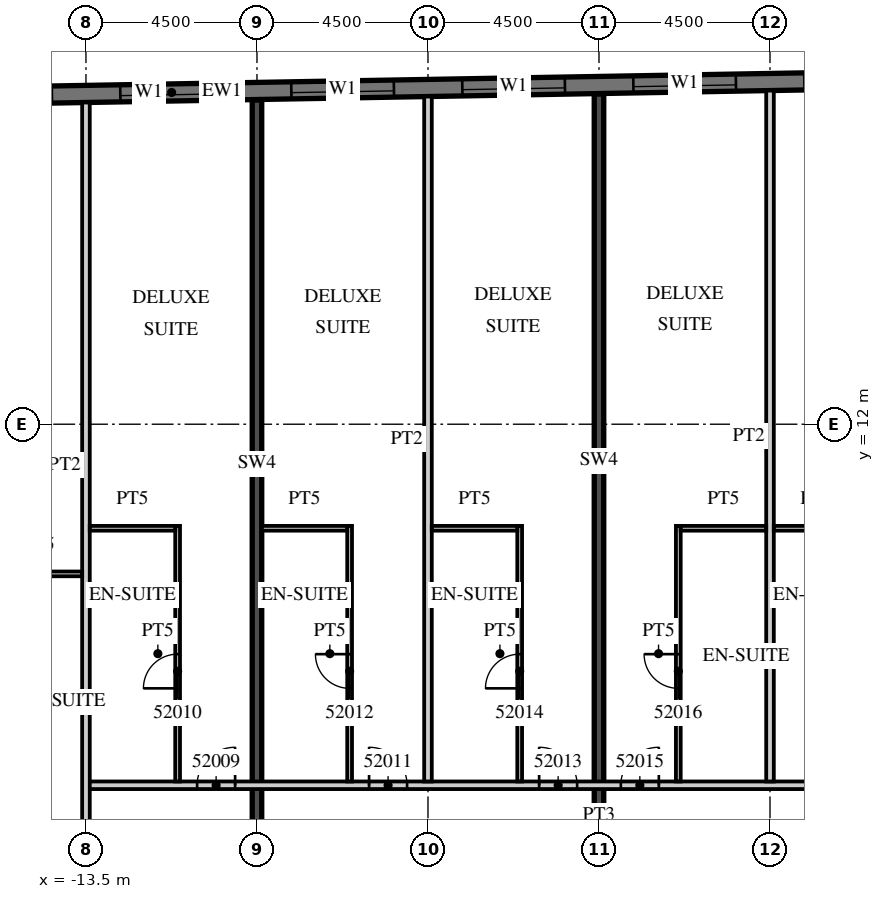
"""IFC4 building model, lengths in metres.
Left out: names, types, materials, properties, quantities, classifications, styles, units other than length and angle.
Written with IfcOpenShell. Run it as: python <this file> out.ifc"""

import sys

from ifc_helpers import new_model, si_unit, direction, frame, frame_2d, origin, place, context, subcontext, project, spatial, rectangle, extrude, element, fill, save


model = new_model("IFC4")
c1 = context("Model", 3, precision=1e-05, world=origin(), true_north=direction((0.0, 1.0)))
c2 = subcontext(c1, "Body", "Model", "MODEL_VIEW")
j1 = project(units=[si_unit("LENGTHUNIT", "METRE"), si_unit("PLANEANGLEUNIT", "RADIAN")], contexts=[c1])
p1 = place(None, origin())
s1 = spatial("IfcSite", under=j1, at=p1, CompositionType="ELEMENT")
p2 = place(p1, origin())
s2 = spatial("IfcBuilding", under=s1, at=p2, CompositionType="ELEMENT")
p3 = place(p2, frame((0.0, 0.0, 217.7)))
s3 = spatial("IfcBuildingStorey", under=s2, at=p3, CompositionType="ELEMENT", Elevation=217.7)
p4 = place(p3, frame((-9.0, 1.4, 0.0), z_axis=(0.0, 0.0, 1.0), x_axis=(0.0, 1.0, 0.0)))
e1 = element("IfcWall", 1, at=p4, inside=s3, PredefinedType="SHEAR", context=c2, shape_type="SweptSolid", body=[
    extrude(rectangle(XDim=19.132, YDim=0.25, at=frame_2d((9.566, 0.0))), origin(), (0.0, 0.0, 1.0), 3.3),
])
p5 = place(p3, frame((0.0, 1.4, 0.0), z_axis=(0.0, 0.0, 1.0), x_axis=(0.0, 1.0, 0.0)))
e2 = element("IfcWall", 2, at=p5, inside=s3, PredefinedType="SHEAR", context=c2, shape_type="SweptSolid", body=[
    extrude(rectangle(XDim=19.289, YDim=0.25, at=frame_2d((9.644, 0.0))), origin(), (0.0, 0.0, 1.0), 3.3),
])
p6 = place(p3, frame((13.504, 21.161, 0.0), z_axis=(0.0, 0.0, 1.0), x_axis=(-0.999847763257, -0.017448504532, 0.0)))
e3 = element("IfcWall", 3, at=p6, inside=s3, PredefinedType="SOLIDWALL", context=c2, shape_type="SweptSolid", body=[
    extrude(rectangle(XDim=46.859, YDim=0.45, at=frame_2d((23.43, 0.0))), origin(), (0.0, 0.0, 1.0), 3.02),
])
p7 = place(p6, frame((0.9, 0.0, 0.45)))
e4 = element("IfcOpeningElement", 4, at=p7, cuts=e3, PredefinedType="OPENING", context=c2, shape_type="SweptSolid", body=[
    extrude(rectangle(XDim=2.7, YDim=2.25, at=frame_2d((1.35, 1.125))), frame((0.0, 0.235, 0.0), z_axis=(0.0, -1.0, 0.0), x_axis=(1.0, 0.0, 0.0)), (0.0, 0.0, 1.0), 0.47),
])
p8 = place(p6, frame((5.401, 0.0, 0.45)))
e5 = element("IfcOpeningElement", 5, at=p8, cuts=e3, PredefinedType="OPENING", context=c2, shape_type="SweptSolid", body=[
    extrude(rectangle(XDim=2.7, YDim=2.25, at=frame_2d((1.35, 1.125))), frame((0.0, 0.235, 0.0), z_axis=(0.0, -1.0, 0.0), x_axis=(1.0, 0.0, 0.0)), (0.0, 0.0, 1.0), 0.47),
])
p9 = place(p6, frame((9.902, 0.0, 0.45)))
e6 = element("IfcOpeningElement", 6, at=p9, cuts=e3, PredefinedType="OPENING", context=c2, shape_type="SweptSolid", body=[
    extrude(rectangle(XDim=2.7, YDim=2.25, at=frame_2d((1.35, 1.125))), frame((0.0, 0.235, 0.0), z_axis=(0.0, -1.0, 0.0), x_axis=(1.0, 0.0, 0.0)), (0.0, 0.0, 1.0), 0.47),
])
p10 = place(p6, frame((14.402, 0.0, 0.45)))
e7 = element("IfcOpeningElement", 7, at=p10, cuts=e3, PredefinedType="OPENING", context=c2, shape_type="SweptSolid", body=[
    extrude(rectangle(XDim=2.7, YDim=2.25, at=frame_2d((1.35, 1.125))), frame((0.0, 0.235, 0.0), z_axis=(0.0, -1.0, 0.0), x_axis=(1.0, 0.0, 0.0)), (0.0, 0.0, 1.0), 0.47),
])
p11 = place(p6, frame((18.903, 0.0, 0.45)))
e8 = element("IfcOpeningElement", 8, at=p11, cuts=e3, PredefinedType="OPENING", context=c2, shape_type="SweptSolid", body=[
    extrude(rectangle(XDim=2.7, YDim=2.25, at=frame_2d((1.35, 1.125))), frame((0.0, 0.235, 0.0), z_axis=(0.0, -1.0, 0.0), x_axis=(1.0, 0.0, 0.0)), (0.0, 0.0, 1.0), 0.47),
])
p12 = place(p6, frame((23.404, 0.0, 0.45)))
e9 = element("IfcOpeningElement", 9, at=p12, cuts=e3, PredefinedType="OPENING", context=c2, shape_type="SweptSolid", body=[
    extrude(rectangle(XDim=2.7, YDim=2.25, at=frame_2d((1.35, 1.125))), frame((0.0, 0.235, 0.0), z_axis=(0.0, -1.0, 0.0), x_axis=(1.0, 0.0, 0.0)), (0.0, 0.0, 1.0), 0.47),
])
p13 = place(p6, frame((27.904, 0.0, 0.45)))
e10 = element("IfcOpeningElement", 10, at=p13, cuts=e3, PredefinedType="OPENING", context=c2, shape_type="SweptSolid", body=[
    extrude(rectangle(XDim=2.7, YDim=2.25, at=frame_2d((1.35, 1.125))), frame((0.0, 0.235, 0.0), z_axis=(0.0, -1.0, 0.0), x_axis=(1.0, 0.0, 0.0)), (0.0, 0.0, 1.0), 0.47),
])
p14 = place(p6, frame((32.405, 0.0, 0.45)))
e11 = element("IfcOpeningElement", 11, at=p14, cuts=e3, PredefinedType="OPENING", context=c2, shape_type="SweptSolid", body=[
    extrude(rectangle(XDim=2.7, YDim=2.25, at=frame_2d((1.35, 1.125))), frame((0.0, 0.235, 0.0), z_axis=(0.0, -1.0, 0.0), x_axis=(1.0, 0.0, 0.0)), (0.0, 0.0, 1.0), 0.47),
])
p15 = place(p6, frame((36.906, 0.0, 0.45)))
e12 = element("IfcOpeningElement", 12, at=p15, cuts=e3, PredefinedType="OPENING", context=c2, shape_type="SweptSolid", body=[
    extrude(rectangle(XDim=2.7, YDim=2.25, at=frame_2d((1.35, 1.125))), frame((0.0, 0.235, 0.0), z_axis=(0.0, -1.0, 0.0), x_axis=(1.0, 0.0, 0.0)), (0.0, 0.0, 1.0), 0.47),
])
p16 = place(p6, frame((41.406, 0.0, 0.45)))
e13 = element("IfcOpeningElement", 13, at=p16, cuts=e3, PredefinedType="OPENING", context=c2, shape_type="SweptSolid", body=[
    extrude(rectangle(XDim=2.7, YDim=2.25, at=frame_2d((1.35, 1.125))), frame((0.0, 0.235, 0.0), z_axis=(0.0, -1.0, 0.0), x_axis=(1.0, 0.0, 0.0)), (0.0, 0.0, 1.0), 0.47),
])
p17 = place(p3, frame((-13.5, 2.5, 0.0), z_axis=(0.0, 0.0, 1.0), x_axis=(1.0, 0.0, 0.0)))
e14 = element("IfcWall", 14, at=p17, inside=s3, PredefinedType="PARTITIONING", context=c2, shape_type="SweptSolid", body=[
    extrude(rectangle(XDim=27.0, YDim=0.2, at=frame_2d((13.5, 0.0))), origin(), (0.0, 0.0, 1.0), 3.02),
])
p18 = place(p17, frame((2.925, 0.0, 0.0)))
e15 = element("IfcOpeningElement", 15, at=p18, cuts=e14, PredefinedType="OPENING", context=c2, shape_type="SweptSolid", body=[
    extrude(rectangle(XDim=1.0, YDim=2.1, at=frame_2d((0.5, 1.05))), frame((0.0, 0.11, 0.0), z_axis=(0.0, -1.0, 0.0), x_axis=(1.0, 0.0, 0.0)), (0.0, 0.0, 1.0), 0.22),
])
p19 = place(p17, frame((7.45, 0.0, 0.0)))
e16 = element("IfcOpeningElement", 16, at=p19, cuts=e14, PredefinedType="OPENING", context=c2, shape_type="SweptSolid", body=[
    extrude(rectangle(XDim=1.0, YDim=2.1, at=frame_2d((0.5, 1.05))), frame((0.0, 0.11, 0.0), z_axis=(0.0, -1.0, 0.0), x_axis=(1.0, 0.0, 0.0)), (0.0, 0.0, 1.0), 0.22),
])
p20 = place(p17, frame((11.925, 0.0, 0.0)))
e17 = element("IfcOpeningElement", 17, at=p20, cuts=e14, PredefinedType="OPENING", context=c2, shape_type="SweptSolid", body=[
    extrude(rectangle(XDim=1.0, YDim=2.1, at=frame_2d((0.5, 1.05))), frame((0.0, 0.11, 0.0), z_axis=(0.0, -1.0, 0.0), x_axis=(1.0, 0.0, 0.0)), (0.0, 0.0, 1.0), 0.22),
])
p21 = place(p17, frame((14.075, 0.0, 0.0)))
e18 = element("IfcOpeningElement", 18, at=p21, cuts=e14, PredefinedType="OPENING", context=c2, shape_type="SweptSolid", body=[
    extrude(rectangle(XDim=1.0, YDim=2.1, at=frame_2d((0.5, 1.05))), frame((0.0, 0.11, 0.0), z_axis=(0.0, -1.0, 0.0), x_axis=(1.0, 0.0, 0.0)), (0.0, 0.0, 1.0), 0.22),
])
p22 = place(p17, frame((20.925, 0.0, 0.0)))
e19 = element("IfcOpeningElement", 19, at=p22, cuts=e14, PredefinedType="OPENING", context=c2, shape_type="SweptSolid", body=[
    extrude(rectangle(XDim=1.0, YDim=2.1, at=frame_2d((0.5, 1.05))), frame((0.0, 0.11, 0.0), z_axis=(0.0, -1.0, 0.0), x_axis=(1.0, 0.0, 0.0)), (0.0, 0.0, 1.0), 0.22),
])
p23 = place(p17, frame((25.425, 0.0, 0.0)))
e20 = element("IfcOpeningElement", 20, at=p23, cuts=e14, PredefinedType="OPENING", context=c2, shape_type="SweptSolid", body=[
    extrude(rectangle(XDim=1.0, YDim=2.1, at=frame_2d((0.5, 1.05))), frame((0.0, 0.11, 0.0), z_axis=(0.0, -1.0, 0.0), x_axis=(1.0, 0.0, 0.0)), (0.0, 0.0, 1.0), 0.22),
])
p24 = place(p3, frame((-13.5, 1.4, 0.0), z_axis=(0.0, 0.0, 1.0), x_axis=(0.0, 1.0, 0.0)))
e21 = element("IfcWall", 21, at=p24, inside=s3, PredefinedType="PARTITIONING", context=c2, shape_type="SweptSolid", body=[
    extrude(rectangle(XDim=19.065, YDim=0.2, at=frame_2d((9.533, 0.0))), origin(), (0.0, 0.0, 1.0), 3.02),
])
p25 = place(p3, frame((-15.85, 8.062, 0.0), z_axis=(0.0, 0.0, 1.0), x_axis=(1.0, 0.0, 0.0)))
e22 = element("IfcWall", 22, at=p25, inside=s3, PredefinedType="PARTITIONING", context=c2, shape_type="SweptSolid", body=[
    extrude(rectangle(XDim=2.25, YDim=0.125, at=frame_2d((1.125, 0.0))), origin(), (0.0, 0.0, 1.0), 3.02),
])
p26 = place(p3, frame((-11.088, 2.6, 0.0), z_axis=(0.0, 0.0, 1.0), x_axis=(0.0, 1.0, 0.0)))
e23 = element("IfcWall", 23, at=p26, inside=s3, PredefinedType="PARTITIONING", context=c2, shape_type="SweptSolid", body=[
    extrude(rectangle(XDim=6.725, YDim=0.125, at=frame_2d((3.362, 0.0))), origin(), (0.0, 0.0, 1.0), 3.02),
])
p27 = place(p26, frame((2.45, 0.0, 0.0)))
e24 = element("IfcOpeningElement", 24, at=p27, cuts=e23, PredefinedType="OPENING", context=c2, shape_type="SweptSolid", body=[
    extrude(rectangle(XDim=0.9, YDim=2.1, at=frame_2d((0.45, 1.05))), frame((0.0, 0.073, 0.0), z_axis=(0.0, -1.0, 0.0), x_axis=(1.0, 0.0, 0.0)), (0.0, 0.0, 1.0), 0.145),
])
p28 = place(p3, frame((-13.4, 9.262, 0.0), z_axis=(0.0, 0.0, 1.0), x_axis=(1.0, 0.0, 0.0)))
e25 = element("IfcWall", 25, at=p28, inside=s3, PredefinedType="PARTITIONING", context=c2, shape_type="SweptSolid", body=[
    extrude(rectangle(XDim=2.25, YDim=0.125, at=frame_2d((1.125, 0.0))), origin(), (0.0, 0.0, 1.0), 3.02),
])
p29 = place(p3, frame((-4.5, 2.6, 0.0), z_axis=(0.0, 0.0, 1.0), x_axis=(0.0, 1.0, 0.0)))
e26 = element("IfcWall", 26, at=p29, inside=s3, PredefinedType="PARTITIONING", context=c2, shape_type="SweptSolid", body=[
    extrude(rectangle(XDim=18.022, YDim=0.2, at=frame_2d((9.011, 0.0))), origin(), (0.0, 0.0, 1.0), 3.02),
])
p30 = place(p3, frame((-6.562, 2.6, 0.0), z_axis=(0.0, 0.0, 1.0), x_axis=(0.0, 1.0, 0.0)))
e27 = element("IfcWall", 27, at=p30, inside=s3, PredefinedType="PARTITIONING", context=c2, shape_type="SweptSolid", body=[
    extrude(rectangle(XDim=6.725, YDim=0.125, at=frame_2d((3.362, 0.0))), origin(), (0.0, 0.0, 1.0), 3.02),
])
p31 = place(p30, frame((2.45, 0.0, 0.0)))
e28 = element("IfcOpeningElement", 28, at=p31, cuts=e27, PredefinedType="OPENING", context=c2, shape_type="SweptSolid", body=[
    extrude(rectangle(XDim=0.9, YDim=2.1, at=frame_2d((0.45, 1.05))), frame((0.0, 0.073, 0.0), z_axis=(0.0, -1.0, 0.0), x_axis=(1.0, 0.0, 0.0)), (0.0, 0.0, 1.0), 0.145),
])
p32 = place(p3, frame((-8.875, 9.262, 0.0), z_axis=(0.0, 0.0, 1.0), x_axis=(1.0, 0.0, 0.0)))
e29 = element("IfcWall", 29, at=p32, inside=s3, PredefinedType="PARTITIONING", context=c2, shape_type="SweptSolid", body=[
    extrude(rectangle(XDim=2.25, YDim=0.125, at=frame_2d((1.125, 0.0))), origin(), (0.0, 0.0, 1.0), 3.02),
])
p33 = place(p3, frame((-2.087, 2.6, 0.0), z_axis=(0.0, 0.0, 1.0), x_axis=(0.0, 1.0, 0.0)))
e30 = element("IfcWall", 30, at=p33, inside=s3, PredefinedType="PARTITIONING", context=c2, shape_type="SweptSolid", body=[
    extrude(rectangle(XDim=6.725, YDim=0.125, at=frame_2d((3.362, 0.0))), origin(), (0.0, 0.0, 1.0), 3.02),
])
p34 = place(p33, frame((2.45, 0.0, 0.0)))
e31 = element("IfcOpeningElement", 31, at=p34, cuts=e30, PredefinedType="OPENING", context=c2, shape_type="SweptSolid", body=[
    extrude(rectangle(XDim=0.9, YDim=2.1, at=frame_2d((0.45, 1.05))), frame((0.0, 0.073, 0.0), z_axis=(0.0, -1.0, 0.0), x_axis=(1.0, 0.0, 0.0)), (0.0, 0.0, 1.0), 0.145),
])
p35 = place(p3, frame((-4.4, 9.262, 0.0), z_axis=(0.0, 0.0, 1.0), x_axis=(1.0, 0.0, 0.0)))
e32 = element("IfcWall", 32, at=p35, inside=s3, PredefinedType="PARTITIONING", context=c2, shape_type="SweptSolid", body=[
    extrude(rectangle(XDim=2.25, YDim=0.125, at=frame_2d((1.125, 0.0))), origin(), (0.0, 0.0, 1.0), 3.02),
])
p36 = place(p3, frame((4.5, 2.6, 0.0), z_axis=(0.0, 0.0, 1.0), x_axis=(0.0, 1.0, 0.0)))
e33 = element("IfcWall", 33, at=p36, inside=s3, PredefinedType="PARTITIONING", context=c2, shape_type="SweptSolid", body=[
    extrude(rectangle(XDim=18.179, YDim=0.2, at=frame_2d((9.089, 0.0))), origin(), (0.0, 0.0, 1.0), 3.02),
])
p37 = place(p3, frame((2.087, 2.6, 0.0), z_axis=(0.0, 0.0, 1.0), x_axis=(0.0, 1.0, 0.0)))
e34 = element("IfcWall", 34, at=p37, inside=s3, PredefinedType="PARTITIONING", context=c2, shape_type="SweptSolid", body=[
    extrude(rectangle(XDim=6.725, YDim=0.125, at=frame_2d((3.362, 0.0))), origin(), (0.0, 0.0, 1.0), 3.02),
])
p38 = place(p37, frame((2.45, 0.0, 0.0)))
e35 = element("IfcOpeningElement", 35, at=p38, cuts=e34, PredefinedType="OPENING", context=c2, shape_type="SweptSolid", body=[
    extrude(rectangle(XDim=0.9, YDim=2.1, at=frame_2d((0.45, 1.05))), frame((0.0, 0.073, 0.0), z_axis=(0.0, -1.0, 0.0), x_axis=(1.0, 0.0, 0.0)), (0.0, 0.0, 1.0), 0.145),
])
for number, where, z_axis, x_axis in (
    (36, (2.15, 9.262, 0.0), (0.0, 0.0, 1.0), (1.0, 0.0, 0.0)),
    (37, (4.6, 9.262, 0.0), (0.0, 0.0, 1.0), (1.0, 0.0, 0.0)),
):
    element("IfcWall", number, at=place(p3, frame(where, z_axis=z_axis, x_axis=x_axis)), inside=s3, PredefinedType="PARTITIONING", context=c2, shape_type="SweptSolid", body=[
        extrude(rectangle(XDim=2.25, YDim=0.125, at=frame_2d((1.125, 0.0))), origin(), (0.0, 0.0, 1.0), 3.02),
    ])
p39 = place(p9, origin())
e38 = element("IfcWindow", 38, at=p39, inside=s3, PartitioningType="SINGLE_PANEL", PredefinedType="WINDOW", context=c2, shape_type="SweptSolid", body=[
    extrude(rectangle(XDim=2.7, YDim=2.25, at=frame_2d((1.35, 1.125))), frame((0.0, 0.09, 0.0), z_axis=(0.0, -1.0, 0.0), x_axis=(1.0, 0.0, 0.0)), (0.0, 0.0, 1.0), 0.06),
])
fill(e6, e38)
p40 = place(p10, origin())
e39 = element("IfcWindow", 39, at=p40, inside=s3, PartitioningType="SINGLE_PANEL", PredefinedType="WINDOW", context=c2, shape_type="SweptSolid", body=[
    extrude(rectangle(XDim=2.7, YDim=2.25, at=frame_2d((1.35, 1.125))), frame((0.0, 0.09, 0.0), z_axis=(0.0, -1.0, 0.0), x_axis=(1.0, 0.0, 0.0)), (0.0, 0.0, 1.0), 0.06),
])
fill(e7, e39)
p41 = place(p11, origin())
e40 = element("IfcWindow", 40, at=p41, inside=s3, PartitioningType="SINGLE_PANEL", PredefinedType="WINDOW", context=c2, shape_type="SweptSolid", body=[
    extrude(rectangle(XDim=2.7, YDim=2.25, at=frame_2d((1.35, 1.125))), frame((0.0, 0.09, 0.0), z_axis=(0.0, -1.0, 0.0), x_axis=(1.0, 0.0, 0.0)), (0.0, 0.0, 1.0), 0.06),
])
fill(e8, e40)
p42 = place(p12, origin())
e41 = element("IfcWindow", 41, at=p42, inside=s3, PartitioningType="SINGLE_PANEL", PredefinedType="WINDOW", context=c2, shape_type="SweptSolid", body=[
    extrude(rectangle(XDim=2.7, YDim=2.25, at=frame_2d((1.35, 1.125))), frame((0.0, 0.09, 0.0), z_axis=(0.0, -1.0, 0.0), x_axis=(1.0, 0.0, 0.0)), (0.0, 0.0, 1.0), 0.06),
])
fill(e9, e41)
p43 = place(p13, origin())
e42 = element("IfcWindow", 42, at=p43, inside=s3, PartitioningType="SINGLE_PANEL", PredefinedType="WINDOW", context=c2, shape_type="SweptSolid", body=[
    extrude(rectangle(XDim=2.7, YDim=2.25, at=frame_2d((1.35, 1.125))), frame((0.0, 0.09, 0.0), z_axis=(0.0, -1.0, 0.0), x_axis=(1.0, 0.0, 0.0)), (0.0, 0.0, 1.0), 0.06),
])
fill(e10, e42)
p44 = place(p18, origin())
e43 = element("IfcDoor", 43, at=p44, inside=s3, OperationType="SINGLE_SWING_RIGHT", PredefinedType="DOOR", context=c2, shape_type="SweptSolid", body=[
    extrude(rectangle(XDim=1.0, YDim=2.1, at=frame_2d((0.5, 1.05))), frame((0.0, 0.025, 0.0), z_axis=(0.0, -1.0, 0.0), x_axis=(1.0, 0.0, 0.0)), (0.0, 0.0, 1.0), 0.05),
])
fill(e15, e43)
p45 = place(p27, origin())
e44 = element("IfcDoor", 44, at=p45, inside=s3, OperationType="SINGLE_SWING_LEFT", PredefinedType="DOOR", context=c2, shape_type="SweptSolid", body=[
    extrude(rectangle(XDim=0.9, YDim=2.1, at=frame_2d((0.45, 1.05))), frame((0.0, 0.025, 0.0), z_axis=(0.0, -1.0, 0.0), x_axis=(1.0, 0.0, 0.0)), (0.0, 0.0, 1.0), 0.05),
])
fill(e24, e44)
p46 = place(p19, origin())
e45 = element("IfcDoor", 45, at=p46, inside=s3, OperationType="SINGLE_SWING_LEFT", PredefinedType="DOOR", context=c2, shape_type="SweptSolid", body=[
    extrude(rectangle(XDim=1.0, YDim=2.1, at=frame_2d((0.5, 1.05))), frame((0.0, 0.025, 0.0), z_axis=(0.0, -1.0, 0.0), x_axis=(1.0, 0.0, 0.0)), (0.0, 0.0, 1.0), 0.05),
])
fill(e16, e45)
p47 = place(p31, origin())
e46 = element("IfcDoor", 46, at=p47, inside=s3, OperationType="SINGLE_SWING_RIGHT", PredefinedType="DOOR", context=c2, shape_type="SweptSolid", body=[
    extrude(rectangle(XDim=0.9, YDim=2.1, at=frame_2d((0.45, 1.05))), frame((0.0, 0.025, 0.0), z_axis=(0.0, -1.0, 0.0), x_axis=(1.0, 0.0, 0.0)), (0.0, 0.0, 1.0), 0.05),
])
fill(e28, e46)
p48 = place(p20, origin())
e47 = element("IfcDoor", 47, at=p48, inside=s3, OperationType="SINGLE_SWING_LEFT", PredefinedType="DOOR", context=c2, shape_type="SweptSolid", body=[
    extrude(rectangle(XDim=1.0, YDim=2.1, at=frame_2d((0.5, 1.05))), frame((0.0, 0.025, 0.0), z_axis=(0.0, -1.0, 0.0), x_axis=(1.0, 0.0, 0.0)), (0.0, 0.0, 1.0), 0.05),
])
fill(e17, e47)
p49 = place(p34, origin())
e48 = element("IfcDoor", 48, at=p49, inside=s3, OperationType="SINGLE_SWING_LEFT", PredefinedType="DOOR", context=c2, shape_type="SweptSolid", body=[
    extrude(rectangle(XDim=0.9, YDim=2.1, at=frame_2d((0.45, 1.05))), frame((0.0, 0.025, 0.0), z_axis=(0.0, -1.0, 0.0), x_axis=(1.0, 0.0, 0.0)), (0.0, 0.0, 1.0), 0.05),
])
fill(e31, e48)
p50 = place(p21, origin())
e49 = element("IfcDoor", 49, at=p50, inside=s3, OperationType="SINGLE_SWING_RIGHT", PredefinedType="DOOR", context=c2, shape_type="SweptSolid", body=[
    extrude(rectangle(XDim=1.0, YDim=2.1, at=frame_2d((0.5, 1.05))), frame((0.0, 0.025, 0.0), z_axis=(0.0, -1.0, 0.0), x_axis=(1.0, 0.0, 0.0)), (0.0, 0.0, 1.0), 0.05),
])
fill(e18, e49)
p51 = place(p38, origin())
e50 = element("IfcDoor", 50, at=p51, inside=s3, OperationType="SINGLE_SWING_RIGHT", PredefinedType="DOOR", context=c2, shape_type="SweptSolid", body=[
    extrude(rectangle(XDim=0.9, YDim=2.1, at=frame_2d((0.45, 1.05))), frame((0.0, 0.025, 0.0), z_axis=(0.0, -1.0, 0.0), x_axis=(1.0, 0.0, 0.0)), (0.0, 0.0, 1.0), 0.05),
])
fill(e35, e50)
save(model, sys.argv[1])
